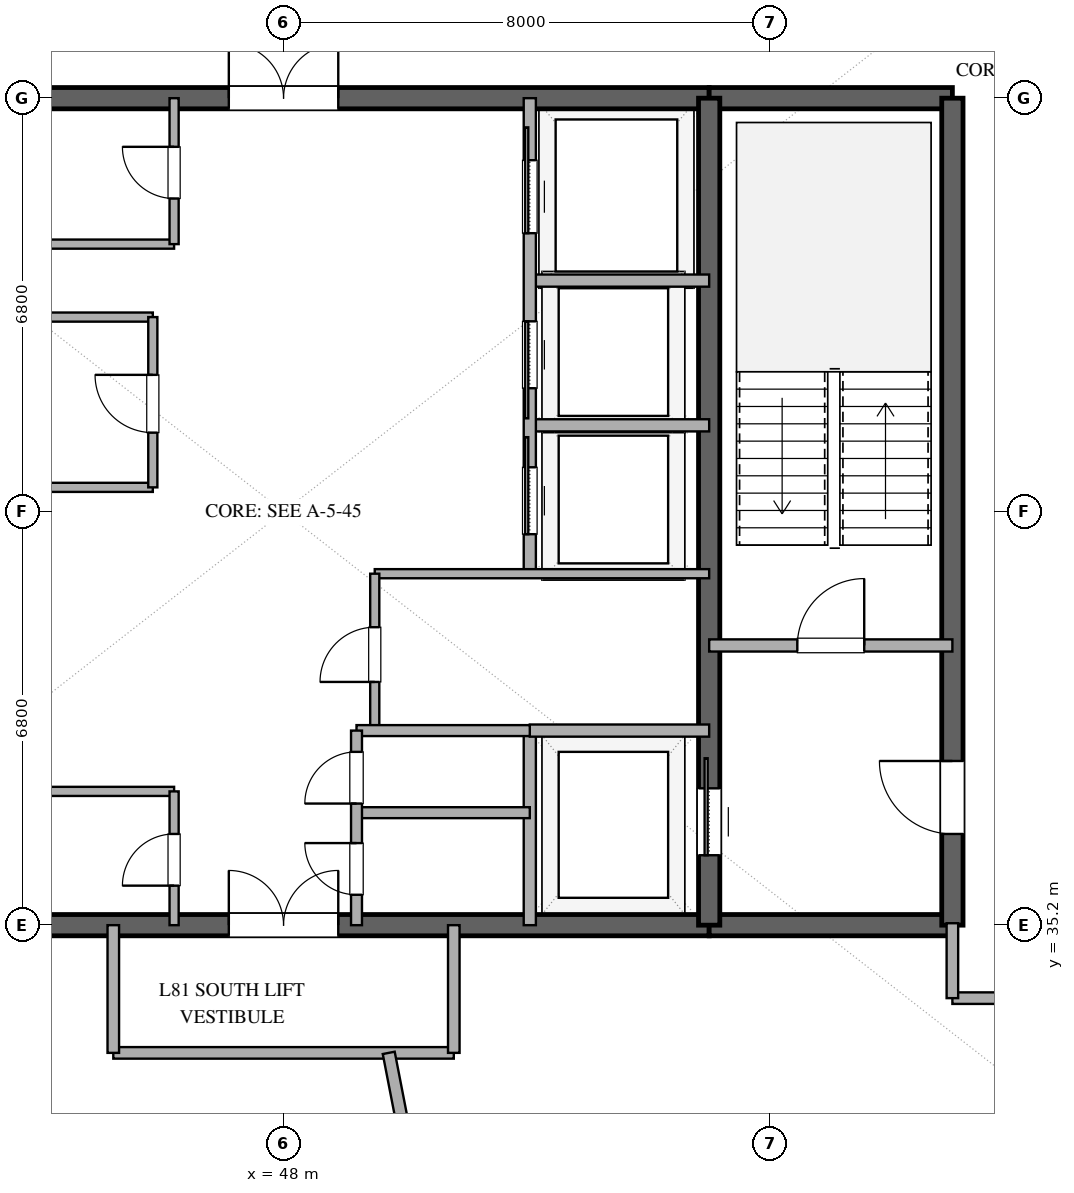
"""IFC4 building model, lengths in metres.
Left out: names, types, materials, properties, quantities, classifications, styles, units other than length and angle.
Written with IfcOpenShell. Run it as: python <this file> out.ifc"""

import sys

from ifc_helpers import new_model, si_unit, direction, frame, frame_2d, origin, place, context, subcontext, project, spatial, rectangle, extrude, element, fill, save


model = new_model("IFC4")
c1 = context("Model", 3, precision=1e-05, world=origin(), true_north=direction((0.0, 1.0)))
c2 = subcontext(c1, "Body", "Model", "MODEL_VIEW")
j1 = project(units=[si_unit("LENGTHUNIT", "METRE"), si_unit("PLANEANGLEUNIT", "RADIAN")], contexts=[c1])
p1 = place(None, origin())
s1 = spatial("IfcSite", under=j1, at=p1, CompositionType="ELEMENT")
p2 = place(p1, origin())
s2 = spatial("IfcBuilding", under=s1, at=p2, CompositionType="ELEMENT")
p3 = place(p2, frame((0.0, 0.0, 312.6)))
s3 = spatial("IfcBuildingStorey", under=s2, at=p3, CompositionType="ELEMENT", Elevation=312.6)
p4 = place(p3, frame((41.0, 35.2, 0.0), z_axis=(0.0, 0.0, 1.0), x_axis=(1.0, 0.0, 0.0)))
e1 = element("IfcWall", 1, at=p4, inside=s3, PredefinedType="SHEAR", context=c2, shape_type="SweptSolid", body=[
    extrude(rectangle(XDim=14.0, YDim=0.35, at=frame_2d((7.0, 0.0))), origin(), (0.0, 0.0, 1.0), 3.64),
])
p5 = place(p4, frame((6.1, 0.0, 0.0)))
e2 = element("IfcOpeningElement", 2, at=p5, cuts=e1, PredefinedType="OPENING", context=c2, shape_type="SweptSolid", body=[
    extrude(rectangle(XDim=1.8, YDim=2.25, at=frame_2d((0.9, 1.125))), frame((0.0, 0.185, 0.0), z_axis=(0.0, -1.0, 0.0), x_axis=(1.0, 0.0, 0.0)), (0.0, 0.0, 1.0), 0.37),
])
p6 = place(p3, frame((55.0, 35.2, 0.0), z_axis=(0.0, 0.0, 1.0), x_axis=(1.0, 0.0, 0.0)))
e3 = element("IfcWall", 3, at=p6, inside=s3, PredefinedType="SHEAR", context=c2, shape_type="SweptSolid", body=[
    extrude(rectangle(XDim=4.0, YDim=0.35, at=frame_2d((2.0, 0.0))), origin(), (0.0, 0.0, 1.0), 3.64),
])
p7 = place(p3, frame((41.0, 48.8, 0.0), z_axis=(0.0, 0.0, 1.0), x_axis=(1.0, 0.0, 0.0)))
e4 = element("IfcWall", 4, at=p7, inside=s3, PredefinedType="SHEAR", context=c2, shape_type="SweptSolid", body=[
    extrude(rectangle(XDim=14.0, YDim=0.35, at=frame_2d((7.0, 0.0))), origin(), (0.0, 0.0, 1.0), 3.64),
])
p8 = place(p7, frame((6.1, 0.0, 0.0)))
e5 = element("IfcOpeningElement", 5, at=p8, cuts=e4, PredefinedType="OPENING", context=c2, shape_type="SweptSolid", body=[
    extrude(rectangle(XDim=1.8, YDim=2.25, at=frame_2d((0.9, 1.125))), frame((0.0, 0.185, 0.0), z_axis=(0.0, -1.0, 0.0), x_axis=(1.0, 0.0, 0.0)), (0.0, 0.0, 1.0), 0.37),
])
p9 = place(p3, frame((55.0, 48.8, 0.0), z_axis=(0.0, 0.0, 1.0), x_axis=(1.0, 0.0, 0.0)))
e6 = element("IfcWall", 6, at=p9, inside=s3, PredefinedType="SHEAR", context=c2, shape_type="SweptSolid", body=[
    extrude(rectangle(XDim=4.0, YDim=0.35, at=frame_2d((2.0, 0.0))), origin(), (0.0, 0.0, 1.0), 3.64),
])
p10 = place(p3, frame((59.0, 35.2, 0.0), z_axis=(0.0, 0.0, 1.0), x_axis=(0.0, 1.0, 0.0)))
e7 = element("IfcWall", 7, at=p10, inside=s3, PredefinedType="SHEAR", context=c2, shape_type="SweptSolid", body=[
    extrude(rectangle(XDim=13.6, YDim=0.35, at=frame_2d((6.8, 0.0))), origin(), (0.0, 0.0, 1.0), 3.64),
])
p11 = place(p10, frame((1.5, 0.0, 0.0)))
e8 = element("IfcOpeningElement", 8, at=p11, cuts=e7, PredefinedType="OPENING", context=c2, shape_type="SweptSolid", body=[
    extrude(rectangle(XDim=1.2, YDim=2.15, at=frame_2d((0.6, 1.075))), frame((0.0, 0.185, 0.0), z_axis=(0.0, -1.0, 0.0), x_axis=(1.0, 0.0, 0.0)), (0.0, 0.0, 1.0), 0.37),
])
p12 = place(p3, frame((55.0, 35.2, 0.0), z_axis=(0.0, 0.0, 1.0), x_axis=(0.0, 1.0, 0.0)))
e9 = element("IfcWall", 9, at=p12, inside=s3, PredefinedType="SHEAR", context=c2, shape_type="SweptSolid", body=[
    extrude(rectangle(XDim=13.6, YDim=0.35, at=frame_2d((6.8, 0.0))), origin(), (0.0, 0.0, 1.0), 3.64),
])
p13 = place(p12, frame((1.15, 0.0, 0.0)))
e10 = element("IfcOpeningElement", 10, at=p13, cuts=e9, PredefinedType="OPENING", context=c2, shape_type="SweptSolid", body=[
    extrude(rectangle(XDim=1.1, YDim=2.2, at=frame_2d((0.55, 1.1))), frame((0.0, 0.185, 0.0), z_axis=(0.0, -1.0, 0.0), x_axis=(1.0, 0.0, 0.0)), (0.0, 0.0, 1.0), 0.37),
])
p14 = place(p3, frame((55.0, 39.8, 0.0), z_axis=(0.0, 0.0, 1.0), x_axis=(1.0, 0.0, 0.0)))
e11 = element("IfcWall", 11, at=p14, inside=s3, PredefinedType="SOLIDWALL", context=c2, shape_type="SweptSolid", body=[
    extrude(rectangle(XDim=4.0, YDim=0.2, at=frame_2d((2.0, 0.0))), origin(), (0.0, 0.0, 1.0), 2.34),
])
p15 = place(p14, frame((1.45, 0.0, 0.0)))
e12 = element("IfcOpeningElement", 12, at=p15, cuts=e11, PredefinedType="OPENING", context=c2, shape_type="SweptSolid", body=[
    extrude(rectangle(XDim=1.1, YDim=2.15, at=frame_2d((0.55, 1.075))), frame((0.0, 0.11, 0.0), z_axis=(0.0, -1.0, 0.0), x_axis=(1.0, 0.0, 0.0)), (0.0, 0.0, 1.0), 0.22),
])
p16 = place(p3, frame((52.05, 35.2, 0.0), z_axis=(0.0, 0.0, 1.0), x_axis=(0.0, 1.0, 0.0)))
e13 = element("IfcWall", 13, at=p16, inside=s3, PredefinedType="SOLIDWALL", context=c2, shape_type="SweptSolid", body=[
    extrude(rectangle(XDim=3.2, YDim=0.2, at=frame_2d((1.6, 0.0))), origin(), (0.0, 0.0, 1.0), 2.34),
])
p17 = place(p3, frame((52.05, 38.4, 0.0), z_axis=(0.0, 0.0, 1.0), x_axis=(1.0, 0.0, 0.0)))
e14 = element("IfcWall", 14, at=p17, inside=s3, PredefinedType="SOLIDWALL", context=c2, shape_type="SweptSolid", body=[
    extrude(rectangle(XDim=2.95, YDim=0.2, at=frame_2d((1.475, 0.0))), origin(), (0.0, 0.0, 1.0), 2.34),
])
p18 = place(p3, frame((41.0, 42.4, 0.0), z_axis=(0.0, 0.0, 1.0), x_axis=(1.0, 0.0, 0.0)))
e15 = element("IfcWall", 15, at=p18, inside=s3, PredefinedType="PARTITIONING", context=c2, shape_type="SweptSolid", body=[
    extrude(rectangle(XDim=4.85, YDim=0.15, at=frame_2d((2.425, 0.0))), origin(), (0.0, 0.0, 1.0), 2.04),
])
p19 = place(p3, frame((41.0, 45.2, 0.0), z_axis=(0.0, 0.0, 1.0), x_axis=(1.0, 0.0, 0.0)))
e16 = element("IfcWall", 16, at=p19, inside=s3, PredefinedType="PARTITIONING", context=c2, shape_type="SweptSolid", body=[
    extrude(rectangle(XDim=4.85, YDim=0.15, at=frame_2d((2.425, 0.0))), origin(), (0.0, 0.0, 1.0), 2.34),
])
p20 = place(p3, frame((45.85, 42.4, 0.0), z_axis=(0.0, 0.0, 1.0), x_axis=(0.0, 1.0, 0.0)))
e17 = element("IfcWall", 17, at=p20, inside=s3, PredefinedType="PARTITIONING", context=c2, shape_type="SweptSolid", body=[
    extrude(rectangle(XDim=2.8, YDim=0.15, at=frame_2d((1.4, 0.0))), origin(), (0.0, 0.0, 1.0), 2.34),
])
p21 = place(p20, frame((0.9, 0.0, 0.0)))
e18 = element("IfcOpeningElement", 18, at=p21, cuts=e17, PredefinedType="OPENING", context=c2, shape_type="SweptSolid", body=[
    extrude(rectangle(XDim=0.95, YDim=2.15, at=frame_2d((0.475, 1.075))), frame((0.0, 0.085, 0.0), z_axis=(0.0, -1.0, 0.0), x_axis=(1.0, 0.0, 0.0)), (0.0, 0.0, 1.0), 0.17),
])
for number, where, z_axis, x_axis in (
    (19, (52.05, 43.42, 0.0), (0.0, 0.0, 1.0), (1.0, 0.0, 0.0)),
    (20, (52.05, 45.8, 0.0), (0.0, 0.0, 1.0), (1.0, 0.0, 0.0)),
):
    element("IfcWall", number, at=place(p3, frame(where, z_axis=z_axis, x_axis=x_axis)), inside=s3, PredefinedType="SOLIDWALL", context=c2, shape_type="SweptSolid", body=[
        extrude(rectangle(XDim=2.95, YDim=0.2, at=frame_2d((1.475, 0.0))), origin(), (0.0, 0.0, 1.0), 2.34),
    ])
p22 = place(p3, frame((52.05, 40.98, 0.0), z_axis=(0.0, 0.0, 1.0), x_axis=(0.0, 1.0, 0.0)))
e21 = element("IfcWall", 21, at=p22, inside=s3, PredefinedType="SOLIDWALL", context=c2, shape_type="SweptSolid", body=[
    extrude(rectangle(XDim=7.82, YDim=0.2, at=frame_2d((3.91, 0.0))), origin(), (0.0, 0.0, 1.0), 2.34),
])
p23 = place(p22, frame((0.65, 0.0, 0.0)))
e22 = element("IfcOpeningElement", 22, at=p23, cuts=e21, PredefinedType="OPENING", context=c2, shape_type="SweptSolid", body=[
    extrude(rectangle(XDim=1.1, YDim=2.2, at=frame_2d((0.55, 1.1))), frame((0.0, 0.11, 0.0), z_axis=(0.0, -1.0, 0.0), x_axis=(1.0, 0.0, 0.0)), (0.0, 0.0, 1.0), 0.22),
])
p24 = place(p22, frame((3.05, 0.0, 0.0)))
e23 = element("IfcOpeningElement", 23, at=p24, cuts=e21, PredefinedType="OPENING", context=c2, shape_type="SweptSolid", body=[
    extrude(rectangle(XDim=1.1, YDim=2.2, at=frame_2d((0.55, 1.1))), frame((0.0, 0.11, 0.0), z_axis=(0.0, -1.0, 0.0), x_axis=(1.0, 0.0, 0.0)), (0.0, 0.0, 1.0), 0.22),
])
p25 = place(p22, frame((5.6, 0.0, 0.0)))
e24 = element("IfcOpeningElement", 24, at=p25, cuts=e21, PredefinedType="OPENING", context=c2, shape_type="SweptSolid", body=[
    extrude(rectangle(XDim=1.2, YDim=2.2, at=frame_2d((0.6, 1.1))), frame((0.0, 0.11, 0.0), z_axis=(0.0, -1.0, 0.0), x_axis=(1.0, 0.0, 0.0)), (0.0, 0.0, 1.0), 0.22),
])
p26 = place(p3, frame((49.5, 40.98, 0.0), z_axis=(0.0, 0.0, 1.0), x_axis=(1.0, 0.0, 0.0)))
e25 = element("IfcWall", 25, at=p26, inside=s3, PredefinedType="PARTITIONING", context=c2, shape_type="SweptSolid", body=[
    extrude(rectangle(XDim=5.5, YDim=0.15, at=frame_2d((2.75, 0.0))), origin(), (0.0, 0.0, 1.0), 2.34),
])
p27 = place(p3, frame((49.5, 38.4, 0.0), z_axis=(0.0, 0.0, 1.0), x_axis=(0.0, 1.0, 0.0)))
e26 = element("IfcWall", 26, at=p27, inside=s3, PredefinedType="PARTITIONING", context=c2, shape_type="SweptSolid", body=[
    extrude(rectangle(XDim=2.58, YDim=0.15, at=frame_2d((1.29, 0.0))), origin(), (0.0, 0.0, 1.0), 2.34),
])
p28 = place(p27, frame((0.8, 0.0, 0.0)))
e27 = element("IfcOpeningElement", 27, at=p28, cuts=e26, PredefinedType="OPENING", context=c2, shape_type="SweptSolid", body=[
    extrude(rectangle(XDim=0.9, YDim=2.15, at=frame_2d((0.45, 1.075))), frame((0.0, 0.085, 0.0), z_axis=(0.0, -1.0, 0.0), x_axis=(1.0, 0.0, 0.0)), (0.0, 0.0, 1.0), 0.17),
])
p29 = place(p3, frame((43.95, 37.4, 0.0), z_axis=(0.0, 0.0, 1.0), x_axis=(1.0, 0.0, 0.0)))
e28 = element("IfcWall", 28, at=p29, inside=s3, PredefinedType="PARTITIONING", context=c2, shape_type="SweptSolid", body=[
    extrude(rectangle(XDim=2.25, YDim=0.15, at=frame_2d((1.125, 0.0))), origin(), (0.0, 0.0, 1.0), 2.34),
])
p30 = place(p3, frame((46.2, 35.2, 0.0), z_axis=(0.0, 0.0, 1.0), x_axis=(0.0, 1.0, 0.0)))
e29 = element("IfcWall", 29, at=p30, inside=s3, PredefinedType="PARTITIONING", context=c2, shape_type="SweptSolid", body=[
    extrude(rectangle(XDim=2.2, YDim=0.15, at=frame_2d((1.1, 0.0))), origin(), (0.0, 0.0, 1.0), 2.34),
])
p31 = place(p30, frame((0.65, 0.0, 0.0)))
e30 = element("IfcOpeningElement", 30, at=p31, cuts=e29, PredefinedType="OPENING", context=c2, shape_type="SweptSolid", body=[
    extrude(rectangle(XDim=0.85, YDim=2.15, at=frame_2d((0.425, 1.075))), frame((0.0, 0.085, 0.0), z_axis=(0.0, -1.0, 0.0), x_axis=(1.0, 0.0, 0.0)), (0.0, 0.0, 1.0), 0.17),
])
p32 = place(p3, frame((43.95, 46.4, 0.0), z_axis=(0.0, 0.0, 1.0), x_axis=(1.0, 0.0, 0.0)))
e31 = element("IfcWall", 31, at=p32, inside=s3, PredefinedType="PARTITIONING", context=c2, shape_type="SweptSolid", body=[
    extrude(rectangle(XDim=2.25, YDim=0.15, at=frame_2d((1.125, 0.0))), origin(), (0.0, 0.0, 1.0), 2.34),
])
p33 = place(p3, frame((46.2, 46.4, 0.0), z_axis=(0.0, 0.0, 1.0), x_axis=(0.0, 1.0, 0.0)))
e32 = element("IfcWall", 32, at=p33, inside=s3, PredefinedType="PARTITIONING", context=c2, shape_type="SweptSolid", body=[
    extrude(rectangle(XDim=2.4, YDim=0.15, at=frame_2d((1.2, 0.0))), origin(), (0.0, 0.0, 1.0), 2.34),
])
p34 = place(p33, frame((0.75, 0.0, 0.0)))
e33 = element("IfcOpeningElement", 33, at=p34, cuts=e32, PredefinedType="OPENING", context=c2, shape_type="SweptSolid", body=[
    extrude(rectangle(XDim=0.85, YDim=2.15, at=frame_2d((0.425, 1.075))), frame((0.0, 0.085, 0.0), z_axis=(0.0, -1.0, 0.0), x_axis=(1.0, 0.0, 0.0)), (0.0, 0.0, 1.0), 0.17),
])
for number, where, z_axis, x_axis in (
    (34, (49.2, 37.05, 0.0), (0.0, 0.0, 1.0), (1.0, 0.0, 0.0)),
    (35, (49.2, 38.4, 0.0), (0.0, 0.0, 1.0), (1.0, 0.0, 0.0)),
):
    element("IfcWall", number, at=place(p3, frame(where, z_axis=z_axis, x_axis=x_axis)), inside=s3, PredefinedType="PLUMBINGWALL", context=c2, shape_type="SweptSolid", body=[
        extrude(rectangle(XDim=2.85, YDim=0.18, at=frame_2d((1.425, 0.0))), origin(), (0.0, 0.0, 1.0), 2.34),
    ])
p35 = place(p3, frame((49.2, 35.2, 0.0), z_axis=(0.0, 0.0, 1.0), x_axis=(0.0, 1.0, 0.0)))
e36 = element("IfcWall", 36, at=p35, inside=s3, PredefinedType="PLUMBINGWALL", context=c2, shape_type="SweptSolid", body=[
    extrude(rectangle(XDim=3.2, YDim=0.18, at=frame_2d((1.6, 0.0))), origin(), (0.0, 0.0, 1.0), 2.34),
])
p36 = place(p35, frame((0.5, 0.0, 0.0)))
e37 = element("IfcOpeningElement", 37, at=p36, cuts=e36, PredefinedType="OPENING", context=c2, shape_type="SweptSolid", body=[
    extrude(rectangle(XDim=0.85, YDim=2.1, at=frame_2d((0.425, 1.05))), frame((0.0, 0.1, 0.0), z_axis=(0.0, -1.0, 0.0), x_axis=(1.0, 0.0, 0.0)), (0.0, 0.0, 1.0), 0.2),
])
p37 = place(p35, frame((2.0, 0.0, 0.0)))
e38 = element("IfcOpeningElement", 38, at=p37, cuts=e36, PredefinedType="OPENING", context=c2, shape_type="SweptSolid", body=[
    extrude(rectangle(XDim=0.85, YDim=2.15, at=frame_2d((0.425, 1.075))), frame((0.0, 0.1, 0.0), z_axis=(0.0, -1.0, 0.0), x_axis=(1.0, 0.0, 0.0)), (0.0, 0.0, 1.0), 0.2),
])
p38 = place(p3, frame((50.8, 33.1, 0.0), z_axis=(0.0, 0.0, 1.0), x_axis=(-1.0, 0.0, 0.0)))
e39 = element("IfcWall", 39, at=p38, inside=s3, PredefinedType="PARTITIONING", context=c2, shape_type="SweptSolid", body=[
    extrude(rectangle(XDim=5.6, YDim=0.19, at=frame_2d((2.8, 0.0))), origin(), (0.0, 0.0, 1.0), 2.34),
])
p39 = place(p3, frame((50.291, 30.216, 0.0), z_axis=(0.0, 0.0, 1.0), x_axis=(-0.190807376865, 0.981627498053, 0.0)))
e40 = element("IfcWall", 40, at=p39, inside=s3, PredefinedType="PARTITIONING", context=c2, shape_type="SweptSolid", body=[
    extrude(rectangle(XDim=2.938, YDim=0.2, at=frame_2d((1.469, 0.0))), origin(), (0.0, 0.0, 1.0), 2.34),
])
p40 = place(p3, frame((61.2, 34.0, 0.0), z_axis=(0.0, 0.0, 1.0), x_axis=(-1.0, 0.0, 0.0)))
e41 = element("IfcWall", 41, at=p40, inside=s3, PredefinedType="PARTITIONING", context=c2, shape_type="SweptSolid", body=[
    extrude(rectangle(XDim=2.2, YDim=0.19, at=frame_2d((1.1, 0.0))), origin(), (0.0, 0.0, 1.0), 2.34),
])
for number, where, z_axis, x_axis in (
    (42, (45.2, 33.1, 0.0), (0.0, 0.0, 1.0), (0.0, 1.0, 0.0)),
    (43, (50.8, 35.2, 0.0), (0.0, 0.0, 1.0), (0.0, -1.0, 0.0)),
):
    element("IfcWall", number, at=place(p3, frame(where, z_axis=z_axis, x_axis=x_axis)), inside=s3, PredefinedType="PARTITIONING", context=c2, shape_type="SweptSolid", body=[
        extrude(rectangle(XDim=2.1, YDim=0.19, at=frame_2d((1.05, 0.0))), origin(), (0.0, 0.0, 1.0), 2.34),
    ])
p41 = place(p3, frame((59.0, 34.0, 0.0), z_axis=(0.0, 0.0, 1.0), x_axis=(0.0, 1.0, 0.0)))
e44 = element("IfcWall", 44, at=p41, inside=s3, PredefinedType="PARTITIONING", context=c2, shape_type="SweptSolid", body=[
    extrude(rectangle(XDim=1.232, YDim=0.19, at=frame_2d((0.616, 0.0))), origin(), (0.0, 0.0, 1.0), 2.34),
])
p42 = place(p13, origin())
e45 = element("IfcDoor", 45, at=p42, inside=s3, OperationType="SLIDING_TO_RIGHT", PredefinedType="DOOR", context=c2, shape_type="SweptSolid", body=[
    extrude(rectangle(XDim=1.1, YDim=2.2, at=frame_2d((0.55, 1.1))), frame((0.0, 0.025, 0.0), z_axis=(0.0, -1.0, 0.0), x_axis=(1.0, 0.0, 0.0)), (0.0, 0.0, 1.0), 0.05),
])
fill(e10, e45)
p43 = place(p11, origin())
e46 = element("IfcDoor", 46, at=p43, inside=s3, OperationType="SINGLE_SWING_RIGHT", PredefinedType="DOOR", context=c2, shape_type="SweptSolid", body=[
    extrude(rectangle(XDim=1.2, YDim=2.15, at=frame_2d((0.6, 1.075))), frame((0.0, 0.025, 0.0), z_axis=(0.0, -1.0, 0.0), x_axis=(1.0, 0.0, 0.0)), (0.0, 0.0, 1.0), 0.05),
])
fill(e8, e46)
p44 = place(p5, origin())
e47 = element("IfcDoor", 47, at=p44, inside=s3, OperationType="DOUBLE_DOOR_SINGLE_SWING", PredefinedType="DOOR", context=c2, shape_type="SweptSolid", body=[
    extrude(rectangle(XDim=1.8, YDim=2.25, at=frame_2d((0.9, 1.125))), frame((0.0, 0.025, 0.0), z_axis=(0.0, -1.0, 0.0), x_axis=(1.0, 0.0, 0.0)), (0.0, 0.0, 1.0), 0.05),
])
fill(e2, e47)
p45 = place(p8, origin())
e48 = element("IfcDoor", 48, at=p45, inside=s3, OperationType="DOUBLE_DOOR_SINGLE_SWING", PredefinedType="DOOR", context=c2, shape_type="SweptSolid", body=[
    extrude(rectangle(XDim=1.8, YDim=2.25, at=frame_2d((0.9, 1.125))), frame((0.0, 0.025, 0.0), z_axis=(0.0, -1.0, 0.0), x_axis=(1.0, 0.0, 0.0)), (0.0, 0.0, 1.0), 0.05),
])
fill(e5, e48)
p46 = place(p15, origin())
e49 = element("IfcDoor", 49, at=p46, inside=s3, OperationType="SINGLE_SWING_RIGHT", PredefinedType="DOOR", context=c2, shape_type="SweptSolid", body=[
    extrude(rectangle(XDim=1.1, YDim=2.15, at=frame_2d((0.55, 1.075))), frame((0.0, 0.025, 0.0), z_axis=(0.0, -1.0, 0.0), x_axis=(1.0, 0.0, 0.0)), (0.0, 0.0, 1.0), 0.05),
])
fill(e12, e49)
p47 = place(p21, origin())
e50 = element("IfcDoor", 50, at=p47, inside=s3, OperationType="SINGLE_SWING_RIGHT", PredefinedType="DOOR", context=c2, shape_type="SweptSolid", body=[
    extrude(rectangle(XDim=0.95, YDim=2.15, at=frame_2d((0.475, 1.075))), frame((0.0, 0.025, 0.0), z_axis=(0.0, -1.0, 0.0), x_axis=(1.0, 0.0, 0.0)), (0.0, 0.0, 1.0), 0.05),
])
fill(e18, e50)
p48 = place(p23, origin())
e51 = element("IfcDoor", 51, at=p48, inside=s3, OperationType="SLIDING_TO_RIGHT", PredefinedType="DOOR", context=c2, shape_type="SweptSolid", body=[
    extrude(rectangle(XDim=1.1, YDim=2.2, at=frame_2d((0.55, 1.1))), frame((0.0, 0.025, 0.0), z_axis=(0.0, -1.0, 0.0), x_axis=(1.0, 0.0, 0.0)), (0.0, 0.0, 1.0), 0.05),
])
fill(e22, e51)
p49 = place(p24, origin())
e52 = element("IfcDoor", 52, at=p49, inside=s3, OperationType="SLIDING_TO_LEFT", PredefinedType="DOOR", context=c2, shape_type="SweptSolid", body=[
    extrude(rectangle(XDim=1.1, YDim=2.2, at=frame_2d((0.55, 1.1))), frame((0.0, 0.025, 0.0), z_axis=(0.0, -1.0, 0.0), x_axis=(1.0, 0.0, 0.0)), (0.0, 0.0, 1.0), 0.05),
])
fill(e23, e52)
p50 = place(p25, origin())
e53 = element("IfcDoor", 53, at=p50, inside=s3, OperationType="SLIDING_TO_RIGHT", PredefinedType="DOOR", context=c2, shape_type="SweptSolid", body=[
    extrude(rectangle(XDim=1.2, YDim=2.2, at=frame_2d((0.6, 1.1))), frame((0.0, 0.025, 0.0), z_axis=(0.0, -1.0, 0.0), x_axis=(1.0, 0.0, 0.0)), (0.0, 0.0, 1.0), 0.05),
])
fill(e24, e53)
p51 = place(p28, origin())
e54 = element("IfcDoor", 54, at=p51, inside=s3, OperationType="SINGLE_SWING_LEFT", PredefinedType="DOOR", context=c2, shape_type="SweptSolid", body=[
    extrude(rectangle(XDim=0.9, YDim=2.15, at=frame_2d((0.45, 1.075))), frame((0.0, 0.025, 0.0), z_axis=(0.0, -1.0, 0.0), x_axis=(1.0, 0.0, 0.0)), (0.0, 0.0, 1.0), 0.05),
])
fill(e27, e54)
p52 = place(p31, origin())
e55 = element("IfcDoor", 55, at=p52, inside=s3, OperationType="SINGLE_SWING_LEFT", PredefinedType="DOOR", context=c2, shape_type="SweptSolid", body=[
    extrude(rectangle(XDim=0.85, YDim=2.15, at=frame_2d((0.425, 1.075))), frame((0.0, 0.025, 0.0), z_axis=(0.0, -1.0, 0.0), x_axis=(1.0, 0.0, 0.0)), (0.0, 0.0, 1.0), 0.05),
])
fill(e30, e55)
p53 = place(p34, origin())
e56 = element("IfcDoor", 56, at=p53, inside=s3, OperationType="SINGLE_SWING_RIGHT", PredefinedType="DOOR", context=c2, shape_type="SweptSolid", body=[
    extrude(rectangle(XDim=0.85, YDim=2.15, at=frame_2d((0.425, 1.075))), frame((0.0, 0.025, 0.0), z_axis=(0.0, -1.0, 0.0), x_axis=(1.0, 0.0, 0.0)), (0.0, 0.0, 1.0), 0.05),
])
fill(e33, e56)
p54 = place(p36, origin())
e57 = element("IfcDoor", 57, at=p54, inside=s3, OperationType="SINGLE_SWING_RIGHT", PredefinedType="DOOR", context=c2, shape_type="SweptSolid", body=[
    extrude(rectangle(XDim=0.85, YDim=2.1, at=frame_2d((0.425, 1.05))), frame((0.0, 0.025, 0.0), z_axis=(0.0, -1.0, 0.0), x_axis=(1.0, 0.0, 0.0)), (0.0, 0.0, 1.0), 0.05),
])
fill(e37, e57)
p55 = place(p37, origin())
e58 = element("IfcDoor", 58, at=p55, inside=s3, OperationType="SINGLE_SWING_LEFT", PredefinedType="DOOR", context=c2, shape_type="SweptSolid", body=[
    extrude(rectangle(XDim=0.85, YDim=2.15, at=frame_2d((0.425, 1.075))), frame((0.0, 0.025, 0.0), z_axis=(0.0, -1.0, 0.0), x_axis=(1.0, 0.0, 0.0)), (0.0, 0.0, 1.0), 0.05),
])
fill(e38, e58)
save(model, sys.argv[1])
